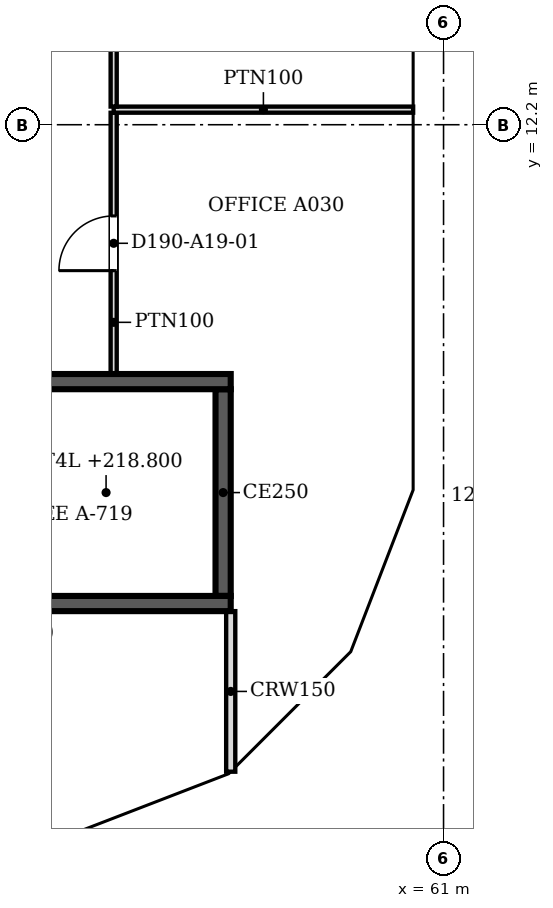
"""IFC4 building model, lengths in metres.
Left out: names, types, materials, properties, quantities, classifications, styles, units other than length and angle.
Written with IfcOpenShell. Run it as: python <this file> out.ifc"""

import sys

from ifc_helpers import new_model, si_unit, direction, frame, frame_2d, origin, place, context, subcontext, project, spatial, polyline, rectangle, outline, extrude, faceted_brep, source, transform, mapped, element, fill, save


model = new_model("IFC4")
c1 = context("Model", 3, precision=1e-05, world=origin(), true_north=direction((0.0, 1.0)))
c2 = subcontext(c1, "Body", "Model", "MODEL_VIEW")
j1 = project(units=[si_unit("LENGTHUNIT", "METRE"), si_unit("PLANEANGLEUNIT", "RADIAN")], contexts=[c1])
p1 = place(None, origin())
s1 = spatial("IfcSite", under=j1, at=p1, CompositionType="ELEMENT")
p2 = place(p1, origin())
s2 = spatial("IfcBuilding", under=s1, at=p2, CompositionType="ELEMENT")
p3 = place(p2, frame((0.0, 0.0, 216.9)))
s3 = spatial("IfcBuildingStorey", under=s2, at=p3, CompositionType="ELEMENT", Elevation=216.9)
m1 = source(origin(), c2, "Body", "Brep", [
    faceted_brep([(2.95, -0.25, 0.0), (3.003, -0.25, 0.068), (3.003, -0.25, 7.531), (2.95, -0.25, 7.6), (0.0, -0.25, 3.8), (0.047, 0.25, 3.86), (2.898, 0.25, 7.532), (2.898, 0.25, 0.068), (0.047, 0.25, 3.74), (2.95, 0.0, 0.0), (2.95, 0.0, 7.6), (0.0, 0.0, 3.8)], [[[0, 1, 2, 3, 4]], [[5, 6, 7, 8]], [[1, 0, 9]], [[10, 3, 2]], [[6, 5, 11, 4, 3, 10]], [[8, 7, 9, 0, 4, 11]], [[8, 11, 5]], [[1, 9, 7, 6, 10, 2]]]),
])
p4 = place(p3, frame((54.854, 0.25, -3.8), z_axis=(0.0, 0.0, 1.0), x_axis=(0.932970071518, 0.359953949349, 0.0)))
e1 = element("IfcWall", 1, at=p4, inside=s3, PredefinedType="SOLIDWALL", context=c2, shape_type="MappedRepresentation", body=[
    mapped(m1, transform((0.0, 0.0, 0.0), scale=1.0)),
])
m2 = source(origin(), c2, "Body", "SweptSolid", [
    extrude(outline(polyline([(2.75, 6.935), (0.316, 3.8), (2.75, 0.665), (2.75, 6.935)])), frame((0.0, 0.26, 0.0), z_axis=(0.0, -1.0, 0.0), x_axis=(1.0, 0.0, 0.0)), (0.0, 0.0, 1.0), 0.52),
])
p5 = place(p4, origin())
e2 = element("IfcOpeningElement", 2, at=p5, cuts=e1, PredefinedType="OPENING", context=c2, shape_type="MappedRepresentation", body=[
    mapped(m2, transform((0.0, 0.0, 0.0), scale=1.0)),
])
m3 = source(origin(), c2, "Body", "Brep", [
    faceted_brep([(0.053, -0.25, 0.0), (2.997, -0.25, 3.8), (0.053, -0.25, 7.6), (0.0, -0.25, 7.532), (0.0, -0.25, 0.068), (0.106, 0.25, 7.531), (2.944, 0.25, 3.868), (2.944, 0.25, 3.732), (0.106, 0.25, 0.068), (2.997, 0.0, 3.8), (0.053, 0.0, 0.0), (0.053, 0.0, 7.6)], [[[0, 1, 2, 3, 4]], [[5, 6, 7, 8]], [[8, 7, 9, 1, 0, 10]], [[6, 5, 11, 2, 1, 9]], [[3, 2, 11]], [[10, 0, 4]], [[8, 10, 4, 3, 11, 5]], [[9, 7, 6]]]),
])
p6 = place(p3, frame((57.569, 1.274, -3.8), z_axis=(0.0, 0.0, 1.0), x_axis=(0.707066050402, 0.707147509625, 0.0)))
e3 = element("IfcWall", 3, at=p6, inside=s3, PredefinedType="SOLIDWALL", context=c2, shape_type="MappedRepresentation", body=[
    mapped(m3, transform((0.0, 0.0, 0.0), scale=1.0)),
])
m4 = source(origin(), c2, "Body", "SweptSolid", [
    extrude(outline(polyline([(0.253, 0.666), (2.681, 3.8), (0.253, 6.934), (0.253, 0.666)])), frame((0.0, 0.26, 0.0), z_axis=(0.0, -1.0, 0.0), x_axis=(1.0, 0.0, 0.0)), (0.0, 0.0, 1.0), 0.52),
])
p7 = place(p6, origin())
e4 = element("IfcOpeningElement", 4, at=p7, cuts=e3, PredefinedType="OPENING", context=c2, shape_type="MappedRepresentation", body=[
    mapped(m4, transform((0.0, 0.0, 0.0), scale=1.0)),
])
m5 = source(origin(), c2, "Body", "Brep", [
    faceted_brep([(2.95, -0.25, 0.0), (2.997, -0.25, 0.059), (2.997, -0.25, 7.541), (2.95, -0.25, 7.6), (0.0, -0.25, 3.8), (0.053, 0.25, 3.868), (2.904, 0.25, 7.54), (2.904, 0.25, 0.06), (0.053, 0.25, 3.732), (2.95, 0.0, 0.0), (2.95, 0.0, 7.6), (0.0, 0.0, 3.8)], [[[0, 1, 2, 3, 4]], [[5, 6, 7, 8]], [[1, 0, 9]], [[10, 3, 2]], [[6, 5, 11, 4, 3, 10]], [[8, 7, 9, 0, 4, 11]], [[8, 11, 5]], [[1, 9, 7, 6, 10, 2]]]),
])
p8 = place(p3, frame((59.688, 3.394, -3.8), z_axis=(0.0, 0.0, 1.0), x_axis=(0.359972353723, 0.932962970624, 0.0)))
e5 = element("IfcWall", 5, at=p8, inside=s3, PredefinedType="SOLIDWALL", context=c2, shape_type="MappedRepresentation", body=[
    mapped(m5, transform((0.0, 0.0, 0.0), scale=1.0)),
])
p9 = place(p8, origin())
e6 = element("IfcOpeningElement", 6, at=p9, cuts=e5, PredefinedType="OPENING", context=c2, shape_type="MappedRepresentation", body=[
    mapped(m2, transform((0.0, 0.0, 0.0), scale=1.0)),
])
m6 = source(origin(), c2, "Body", "Brep", [
    faceted_brep([(0.047, -0.25, 0.0), (3.05, -0.25, 3.8), (0.047, -0.25, 7.6), (0.0, -0.25, 7.54), (0.0, -0.25, 0.06), (0.093, 0.25, 7.541), (3.05, 0.25, 3.8), (0.093, 0.25, 0.059), (0.047, 0.0, 0.0), (0.047, 0.0, 7.6)], [[[0, 1, 2, 3, 4]], [[5, 6, 7]], [[7, 6, 1, 0, 8]], [[6, 5, 9, 2, 1]], [[3, 2, 9]], [[8, 0, 4]], [[7, 8, 4, 3, 9, 5]]]),
])
p10 = place(p3, frame((60.75, 6.1, -3.8), z_axis=(0.0, 0.0, 1.0), x_axis=(0.0, 1.0, 0.0)))
e7 = element("IfcWall", 7, at=p10, inside=s3, PredefinedType="SOLIDWALL", context=c2, shape_type="MappedRepresentation", body=[
    mapped(m6, transform((0.0, 0.0, 0.0), scale=1.0)),
])
m7 = source(origin(), c2, "Body", "SweptSolid", [
    extrude(outline(polyline([(0.247, 0.656), (2.731, 3.8), (0.247, 6.944), (0.247, 0.656)])), frame((0.0, 0.26, 0.0), z_axis=(0.0, -1.0, 0.0), x_axis=(1.0, 0.0, 0.0)), (0.0, 0.0, 1.0), 0.52),
])
p11 = place(p10, origin())
e8 = element("IfcOpeningElement", 8, at=p11, cuts=e7, PredefinedType="OPENING", context=c2, shape_type="MappedRepresentation", body=[
    mapped(m7, transform((0.0, 0.0, 0.0), scale=1.0)),
])
m8 = source(origin(), c2, "Body", "SweptSolid", [
    extrude(outline(polyline([(3.05, 0.0), (6.1, 3.8), (3.05, 7.6), (0.0, 3.8), (3.05, 0.0)])), frame((0.0, 0.25, 0.0), z_axis=(0.0, -1.0, 0.0), x_axis=(1.0, 0.0, 0.0)), (0.0, 0.0, 1.0), 0.5),
])
p12 = place(p3, frame((60.75, 9.15, -3.8), z_axis=(0.0, 0.0, 1.0), x_axis=(0.0, 1.0, 0.0)))
e9 = element("IfcWall", 9, at=p12, inside=s3, PredefinedType="SOLIDWALL", context=c2, shape_type="MappedRepresentation", body=[
    mapped(m8, transform((0.0, 0.0, 0.0), scale=1.0)),
])
m9 = source(origin(), c2, "Body", "SweptSolid", [
    extrude(outline(polyline([(3.05, 0.399), (5.78, 3.8), (3.05, 7.2), (0.321, 3.8), (3.05, 0.399)])), frame((0.0, 0.26, 0.0), z_axis=(0.0, -1.0, 0.0), x_axis=(1.0, 0.0, 0.0)), (0.0, 0.0, 1.0), 0.52),
])
p13 = place(p12, origin())
e10 = element("IfcOpeningElement", 10, at=p13, cuts=e9, PredefinedType="OPENING", context=c2, shape_type="MappedRepresentation", body=[
    mapped(m9, transform((0.0, 0.0, 0.0), scale=1.0)),
])
p14 = place(p2, frame((0.0, 0.0, 220.7)))
s4 = spatial("IfcBuildingStorey", under=s2, at=p14, CompositionType="ELEMENT", Elevation=220.7)
m10 = source(origin(), c2, "Body", "Brep", [
    faceted_brep([(0.047, -0.25, 0.0), (2.997, -0.25, 3.8), (0.047, -0.25, 7.6), (0.0, -0.25, 7.541), (0.0, -0.25, 0.059), (0.093, 0.25, 7.54), (2.944, 0.25, 3.868), (2.944, 0.25, 3.732), (0.093, 0.25, 0.06), (2.997, 0.0, 3.8), (0.047, 0.0, 0.0), (0.047, 0.0, 7.6)], [[[0, 1, 2, 3, 4]], [[5, 6, 7, 8]], [[8, 7, 9, 1, 0, 10]], [[6, 5, 11, 2, 1, 9]], [[3, 2, 11]], [[10, 0, 4]], [[8, 10, 4, 3, 11, 5]], [[9, 7, 6]]]),
])
p15 = place(p14, frame((54.81, 0.233, -3.8), z_axis=(0.0, 0.0, 1.0), x_axis=(0.932990326376, 0.359901446078, 0.0)))
e11 = element("IfcWall", 11, at=p15, inside=s4, PredefinedType="SOLIDWALL", context=c2, shape_type="MappedRepresentation", body=[
    mapped(m10, transform((0.0, 0.0, 0.0), scale=1.0)),
])
m11 = source(origin(), c2, "Body", "SweptSolid", [
    extrude(outline(polyline([(0.247, 0.665), (2.681, 3.8), (0.247, 6.935), (0.247, 0.665)])), frame((0.0, 0.26, 0.0), z_axis=(0.0, -1.0, 0.0), x_axis=(1.0, 0.0, 0.0)), (0.0, 0.0, 1.0), 0.52),
])
p16 = place(p15, origin())
e12 = element("IfcOpeningElement", 12, at=p16, cuts=e11, PredefinedType="OPENING", context=c2, shape_type="MappedRepresentation", body=[
    mapped(m11, transform((0.0, 0.0, 0.0), scale=1.0)),
])
m12 = source(origin(), c2, "Body", "Brep", [
    faceted_brep([(2.944, -0.25, 0.0), (2.997, -0.25, 0.068), (2.997, -0.25, 7.532), (2.944, -0.25, 7.6), (0.0, -0.25, 3.8), (0.053, 0.25, 3.868), (2.891, 0.25, 7.532), (2.891, 0.25, 0.068), (0.053, 0.25, 3.732), (2.944, 0.0, 0.0), (2.944, 0.0, 7.6), (0.0, 0.0, 3.8)], [[[0, 1, 2, 3, 4]], [[5, 6, 7, 8]], [[1, 0, 9]], [[10, 3, 2]], [[6, 5, 11, 4, 3, 10]], [[8, 7, 9, 0, 4, 11]], [[8, 11, 5]], [[1, 9, 7, 6, 10, 2]]]),
])
p17 = place(p14, frame((57.606, 1.312, -3.8), z_axis=(0.0, 0.0, 1.0), x_axis=(0.707147509625, 0.707066050402, 0.0)))
e13 = element("IfcWall", 13, at=p17, inside=s4, PredefinedType="SOLIDWALL", context=c2, shape_type="MappedRepresentation", body=[
    mapped(m12, transform((0.0, 0.0, 0.0), scale=1.0)),
])
m13 = source(origin(), c2, "Body", "SweptSolid", [
    extrude(outline(polyline([(2.744, 6.934), (0.316, 3.8), (2.744, 0.667), (2.744, 6.934)])), frame((0.0, 0.26, 0.0), z_axis=(0.0, -1.0, 0.0), x_axis=(1.0, 0.0, 0.0)), (0.0, 0.0, 1.0), 0.52),
])
p18 = place(p17, origin())
e14 = element("IfcOpeningElement", 14, at=p18, cuts=e13, PredefinedType="OPENING", context=c2, shape_type="MappedRepresentation", body=[
    mapped(m13, transform((0.0, 0.0, 0.0), scale=1.0)),
])
m14 = source(origin(), c2, "Body", "Brep", [
    faceted_brep([(0.053, -0.25, 0.0), (3.003, -0.25, 3.8), (0.053, -0.25, 7.6), (0.0, -0.25, 7.532), (0.0, -0.25, 0.068), (0.106, 0.25, 7.532), (2.957, 0.25, 3.86), (2.957, 0.25, 3.74), (0.106, 0.25, 0.068), (3.003, 0.0, 3.8), (0.053, 0.0, 0.0), (0.053, 0.0, 7.6)], [[[0, 1, 2, 3, 4]], [[5, 6, 7, 8]], [[8, 7, 9, 1, 0, 10]], [[6, 5, 11, 2, 1, 9]], [[3, 2, 11]], [[10, 0, 4]], [[8, 10, 4, 3, 11, 5]], [[9, 7, 6]]]),
])
p19 = place(p14, frame((59.669, 3.344, -3.8), z_axis=(0.0, 0.0, 1.0), x_axis=(0.35992665181, 0.932980602862, 0.0)))
e15 = element("IfcWall", 15, at=p19, inside=s4, PredefinedType="SOLIDWALL", context=c2, shape_type="MappedRepresentation", body=[
    mapped(m14, transform((0.0, 0.0, 0.0), scale=1.0)),
])
m15 = source(origin(), c2, "Body", "SweptSolid", [
    extrude(outline(polyline([(0.253, 0.665), (2.687, 3.8), (0.253, 6.935), (0.253, 0.665)])), frame((0.0, 0.26, 0.0), z_axis=(0.0, -1.0, 0.0), x_axis=(1.0, 0.0, 0.0)), (0.0, 0.0, 1.0), 0.52),
])
p20 = place(p19, origin())
e16 = element("IfcOpeningElement", 16, at=p20, cuts=e15, PredefinedType="OPENING", context=c2, shape_type="MappedRepresentation", body=[
    mapped(m15, transform((0.0, 0.0, 0.0), scale=1.0)),
])
m16 = source(origin(), c2, "Body", "Brep", [
    faceted_brep([(3.003, -0.25, 0.0), (6.053, -0.25, 3.8), (3.003, -0.25, 7.6), (0.0, -0.25, 3.8), (0.047, 0.25, 3.859), (3.003, 0.25, 7.6), (6.053, 0.25, 3.8), (3.003, 0.25, 0.0), (0.047, 0.25, 3.741), (0.0, 0.0, 3.8)], [[[0, 1, 2, 3]], [[4, 5, 6, 7, 8]], [[7, 6, 1, 0]], [[6, 5, 2, 1]], [[5, 4, 9, 3, 2]], [[8, 7, 0, 3, 9]], [[8, 9, 4]]]),
])
p21 = place(p14, frame((60.75, 6.146, -3.8), z_axis=(0.0, 0.0, 1.0), x_axis=(0.0, 1.0, 0.0)))
e17 = element("IfcWall", 17, at=p21, inside=s4, PredefinedType="SOLIDWALL", context=c2, shape_type="MappedRepresentation", body=[
    mapped(m16, transform((0.0, 0.0, 0.0), scale=1.0)),
])
m17 = source(origin(), c2, "Body", "SweptSolid", [
    extrude(outline(polyline([(3.005, 0.401), (5.733, 3.8), (3.005, 7.199), (0.319, 3.8), (3.005, 0.401)])), frame((0.0, 0.26, 0.0), z_axis=(0.0, -1.0, 0.0), x_axis=(1.0, 0.0, 0.0)), (0.0, 0.0, 1.0), 0.52),
])
p22 = place(p21, origin())
e18 = element("IfcOpeningElement", 18, at=p22, cuts=e17, PredefinedType="OPENING", context=c2, shape_type="MappedRepresentation", body=[
    mapped(m17, transform((0.0, 0.0, 0.0), scale=1.0)),
])
m18 = source(origin(), c2, "Body", "SweptSolid", [
    extrude(outline(polyline([(3.05, 0.0), (6.1, 3.8), (3.05, 7.6), (0.0, 3.8), (3.05, 0.0)])), frame((0.0, 0.25, 0.0), z_axis=(0.0, -1.0, 0.0), x_axis=(1.0, 0.0, 0.0)), (0.0, 0.0, 1.0), 0.5),
])
p23 = place(p14, frame((60.75, 12.2, -3.8), z_axis=(0.0, 0.0, 1.0), x_axis=(0.0, 1.0, 0.0)))
e19 = element("IfcWall", 19, at=p23, inside=s4, PredefinedType="SOLIDWALL", context=c2, shape_type="MappedRepresentation", body=[
    mapped(m18, transform((0.0, 0.0, 0.0), scale=1.0)),
])
m19 = source(origin(), c2, "Body", "SweptSolid", [
    extrude(outline(polyline([(3.05, 0.399), (5.78, 3.8), (3.05, 7.201), (0.321, 3.8), (3.05, 0.399)])), frame((0.0, 0.26, 0.0), z_axis=(0.0, -1.0, 0.0), x_axis=(1.0, 0.0, 0.0)), (0.0, 0.0, 1.0), 0.52),
])
p24 = place(p23, origin())
e20 = element("IfcOpeningElement", 20, at=p24, cuts=e19, PredefinedType="OPENING", context=c2, shape_type="MappedRepresentation", body=[
    mapped(m19, transform((0.0, 0.0, 0.0), scale=1.0)),
])
p25 = place(p3, frame((57.5, 4.325, 0.0), z_axis=(0.0, 0.0, 1.0), x_axis=(-1.0, 0.0, 0.0)))
e21 = element("IfcWall", 21, at=p25, inside=s3, PredefinedType="SOLIDWALL", context=c2, shape_type="SweptSolid", body=[
    extrude(rectangle(XDim=8.5, YDim=0.25, at=frame_2d((4.25, 0.0))), origin(), (0.0, 0.0, 1.0), 3.8),
])
m20 = source(origin(), c2, "Body", "SweptSolid", [
    extrude(rectangle(XDim=1.2, YDim=2.1, at=frame_2d((0.6, 1.05))), frame((0.0, 0.135, 0.0), z_axis=(0.0, -1.0, 0.0), x_axis=(1.0, 0.0, 0.0)), (0.0, 0.0, 1.0), 0.27),
])
p26 = place(p25, frame((6.9, 0.0, 0.0)))
e22 = element("IfcOpeningElement", 22, at=p26, cuts=e21, PredefinedType="OPENING", context=c2, shape_type="MappedRepresentation", body=[
    mapped(m20, transform((0.0, 0.0, 0.0), scale=1.0)),
])
p27 = place(p3, frame((49.0, 7.975, 0.0), z_axis=(0.0, 0.0, 1.0), x_axis=(1.0, 0.0, 0.0)))
e23 = element("IfcWall", 23, at=p27, inside=s3, PredefinedType="SOLIDWALL", context=c2, shape_type="SweptSolid", body=[
    extrude(rectangle(XDim=8.5, YDim=0.25, at=frame_2d((4.25, 0.0))), origin(), (0.0, 0.0, 1.0), 3.8),
])
p28 = place(p3, frame((57.375, 7.85, 0.0), z_axis=(0.0, 0.0, 1.0), x_axis=(0.0, -1.0, 0.0)))
e24 = element("IfcWall", 24, at=p28, inside=s3, PredefinedType="SOLIDWALL", context=c2, shape_type="SweptSolid", body=[
    extrude(rectangle(XDim=3.4, YDim=0.25, at=frame_2d((1.7, 0.0))), origin(), (0.0, 0.0, 1.0), 3.8),
])
p29 = place(p3, frame((57.5, 1.559, 0.0), z_axis=(0.0, 0.0, 1.0), x_axis=(0.0, 1.0, 0.0)))
e25 = element("IfcWall", 25, at=p29, inside=s3, PredefinedType="PARTITIONING", context=c2, shape_type="SweptSolid", body=[
    extrude(rectangle(XDim=2.641, YDim=0.15, at=frame_2d((1.32, 0.0))), origin(), (0.0, 0.0, 1.0), 3.067),
])
p30 = place(p3, frame((55.575, 12.397, 0.0), z_axis=(0.0, 0.0, 1.0), x_axis=(0.0, -1.0, 0.0)))
e26 = element("IfcWall", 26, at=p30, inside=s3, PredefinedType="PARTITIONING", context=c2, shape_type="SweptSolid", body=[
    extrude(rectangle(XDim=4.297, YDim=0.1, at=frame_2d((2.148, 0.0))), origin(), (0.0, 0.0, 1.0), 3.067),
])
m21 = source(origin(), c2, "Body", "SweptSolid", [
    extrude(rectangle(XDim=0.9, YDim=2.1, at=frame_2d((0.45, 1.05))), frame((0.0, 0.06, 0.0), z_axis=(0.0, -1.0, 0.0), x_axis=(1.0, 0.0, 0.0)), (0.0, 0.0, 1.0), 0.12),
])
p31 = place(p30, frame((1.697, 0.0, 0.0)))
e27 = element("IfcOpeningElement", 27, at=p31, cuts=e26, PredefinedType="OPENING", context=c2, shape_type="MappedRepresentation", body=[
    mapped(m21, transform((0.0, 0.0, 0.0), scale=1.0)),
])
p32 = place(p3, frame((55.575, 12.448, 0.0), z_axis=(0.0, 0.0, 1.0), x_axis=(1.0, 0.0, 0.0)))
e28 = element("IfcWall", 28, at=p32, inside=s3, PredefinedType="PARTITIONING", context=c2, shape_type="SweptSolid", body=[
    extrude(rectangle(XDim=4.925, YDim=0.1, at=frame_2d((2.462, 0.0))), origin(), (0.0, 0.0, 1.0), 3.067),
])
p33 = place(p3, frame((55.575, 17.024, 0.0), z_axis=(0.0, 0.0, 1.0), x_axis=(0.0, -1.0, 0.0)))
e29 = element("IfcWall", 29, at=p33, inside=s3, PredefinedType="PARTITIONING", context=c2, shape_type="SweptSolid", body=[
    extrude(rectangle(XDim=4.525, YDim=0.1, at=frame_2d((2.263, 0.0))), origin(), (0.0, 0.0, 1.0), 3.067),
])
p34 = place(p33, frame((1.825, 0.0, 0.0)))
e30 = element("IfcOpeningElement", 30, at=p34, cuts=e29, PredefinedType="OPENING", context=c2, shape_type="MappedRepresentation", body=[
    mapped(m21, transform((0.0, 0.0, 0.0), scale=1.0)),
])
m22 = source(origin(), c2, "Body", "SweptSolid", [
    extrude(rectangle(XDim=0.9, YDim=2.1, at=frame_2d((0.45, 1.05))), frame((0.0, 0.025, 0.0), z_axis=(0.0, -1.0, 0.0), x_axis=(1.0, 0.0, 0.0)), (0.0, 0.0, 1.0), 0.05),
])
p35 = place(p31, origin())
e31 = element("IfcDoor", 31, at=p35, inside=s3, OperationType="SINGLE_SWING_RIGHT", PredefinedType="DOOR", context=c2, shape_type="MappedRepresentation", body=[
    mapped(m22, transform((0.0, 0.0, 0.0), scale=1.0)),
])
fill(e27, e31)
save(model, sys.argv[1])
